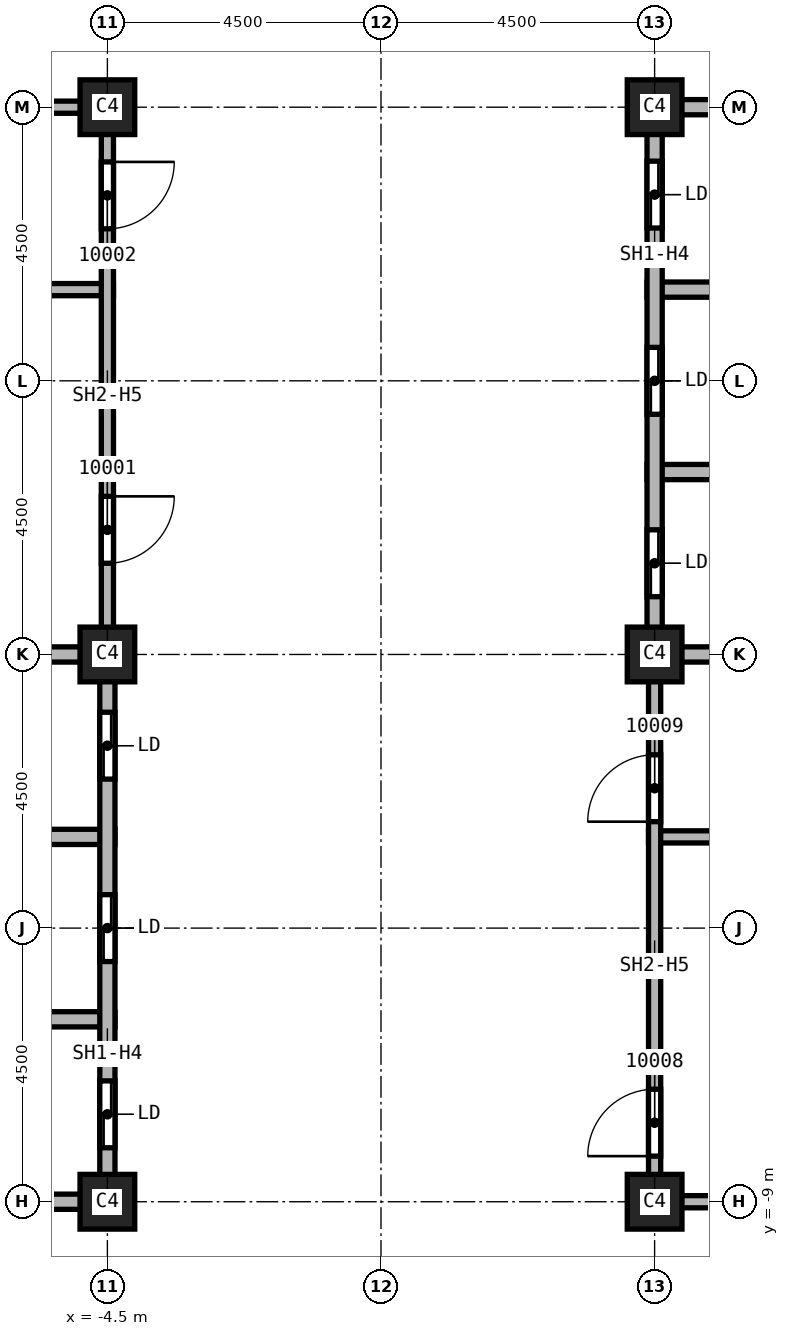
"""IFC4 building model, lengths in metres.
Left out: names, types, materials, properties, quantities, classifications, styles, units other than length and angle.
Written with IfcOpenShell. Run it as: python <this file> out.ifc"""

import sys

from ifc_helpers import new_model, si_unit, direction, frame, frame_2d, origin, origin_2d, place, context, subcontext, project, spatial, rectangle, extrude, element, fill, save


model = new_model("IFC4")
c1 = context("Model", 3, precision=1e-05, world=origin(), true_north=direction((0.0, 1.0)))
c2 = subcontext(c1, "Body", "Model", "MODEL_VIEW")
j1 = project(units=[si_unit("LENGTHUNIT", "METRE"), si_unit("PLANEANGLEUNIT", "RADIAN")], contexts=[c1])
p1 = place(None, origin())
s1 = spatial("IfcSite", under=j1, at=p1, CompositionType="ELEMENT")
p2 = place(p1, origin())
s2 = spatial("IfcBuilding", under=s1, at=p2, CompositionType="ELEMENT")
p3 = place(p2, frame((0.0, 0.0, 174.0)))
s3 = spatial("IfcBuildingStorey", under=s2, at=p3, CompositionType="ELEMENT", Elevation=174.0)
for number, where, z_axis, x_axis in (
    (1, (4.5, 0.0, 0.0), (0.0, 0.0, 1.0), (1.0, 0.0, 0.0)),
    (2, (4.5, 9.0, 0.0), (0.0, 0.0, 1.0), (1.0, 0.0, 0.0)),
    (3, (4.5, -9.0, 0.0), (0.0, 0.0, 1.0), (1.0, 0.0, 0.0)),
    (4, (-4.5, 0.0, 0.0), (0.0, 0.0, 1.0), (1.0, 0.0, 0.0)),
    (5, (-4.5, 9.0, 0.0), (0.0, 0.0, 1.0), (1.0, 0.0, 0.0)),
    (6, (-4.5, -9.0, 0.0), (0.0, 0.0, 1.0), (1.0, 0.0, 0.0)),
):
    element("IfcColumn", number, at=place(p3, frame(where, z_axis=z_axis, x_axis=x_axis)), inside=s3, PredefinedType="COLUMN", context=c2, shape_type="SweptSolid", body=[
        extrude(rectangle(XDim=0.9, YDim=0.9, at=origin_2d()), origin(), (0.0, 0.0, 1.0), 3.59),
    ])
p4 = place(p3, frame((-7.6, 6.0, 0.0), z_axis=(0.0, 0.0, 1.0), x_axis=(1.0, 0.0, 0.0)))
e7 = element("IfcWall", 7, at=p4, inside=s3, PredefinedType="SOLIDWALL", context=c2, shape_type="SweptSolid", body=[
    extrude(rectangle(XDim=3.2, YDim=0.2, at=frame_2d((1.6, 0.0))), origin(), (0.0, 0.0, 1.0), 3.59),
])
p5 = place(p3, frame((-7.5, 9.0, 0.0), z_axis=(0.0, 0.0, 1.0), x_axis=(1.0, 0.0, 0.0)))
e8 = element("IfcWall", 8, at=p5, inside=s3, PredefinedType="SOLIDWALL", context=c2, shape_type="SweptSolid", body=[
    extrude(rectangle(XDim=3.0, YDim=0.2, at=frame_2d((1.5, 0.0))), origin(), (0.0, 0.0, 1.0), 2.828),
])
p6 = place(p3, frame((-4.5, 9.1, 0.0), z_axis=(0.0, 0.0, 1.0), x_axis=(0.0, -1.0, 0.0)))
e9 = element("IfcWall", 9, at=p6, inside=s3, PredefinedType="SOLIDWALL", context=c2, shape_type="SweptSolid", body=[
    extrude(rectangle(XDim=9.1, YDim=0.2, at=frame_2d((4.55, 0.0))), origin(), (0.0, 0.0, 1.0), 2.828),
])
p7 = place(p6, frame((6.5, 0.0, 0.0)))
e10 = element("IfcOpeningElement", 10, at=p7, cuts=e9, PredefinedType="OPENING", context=c2, shape_type="SweptSolid", body=[
    extrude(rectangle(XDim=1.1, YDim=2.1, at=frame_2d((0.55, 1.05))), frame((0.0, 0.1, 0.0), z_axis=(0.0, -1.0, 0.0), x_axis=(1.0, 0.0, 0.0)), (0.0, 0.0, 1.0), 0.2),
])
p8 = place(p6, frame((1.0, 0.0, 0.0)))
e11 = element("IfcOpeningElement", 11, at=p8, cuts=e9, PredefinedType="OPENING", context=c2, shape_type="SweptSolid", body=[
    extrude(rectangle(XDim=1.1, YDim=2.1, at=frame_2d((0.55, 1.05))), frame((0.0, 0.1, 0.0), z_axis=(0.0, -1.0, 0.0), x_axis=(1.0, 0.0, 0.0)), (0.0, 0.0, 1.0), 0.2),
])
p9 = place(p3, frame((4.4, -3.0, 0.0), z_axis=(0.0, 0.0, 1.0), x_axis=(1.0, 0.0, 0.0)))
e12 = element("IfcWall", 12, at=p9, inside=s3, PredefinedType="SOLIDWALL", context=c2, shape_type="SweptSolid", body=[
    extrude(rectangle(XDim=3.225, YDim=0.2, at=frame_2d((1.613, 0.0))), origin(), (0.0, 0.0, 1.0), 3.59),
])
p10 = place(p3, frame((4.5, -9.1, 0.0), z_axis=(0.0, 0.0, 1.0), x_axis=(0.0, 1.0, 0.0)))
e13 = element("IfcWall", 13, at=p10, inside=s3, PredefinedType="SOLIDWALL", context=c2, shape_type="SweptSolid", body=[
    extrude(rectangle(XDim=9.1, YDim=0.2, at=frame_2d((4.55, 0.0))), origin(), (0.0, 0.0, 1.0), 2.828),
])
p11 = place(p10, frame((0.85, 0.0, 0.0)))
e14 = element("IfcOpeningElement", 14, at=p11, cuts=e13, PredefinedType="OPENING", context=c2, shape_type="SweptSolid", body=[
    extrude(rectangle(XDim=1.1, YDim=2.1, at=frame_2d((0.55, 1.05))), frame((0.0, 0.1, 0.0), z_axis=(0.0, -1.0, 0.0), x_axis=(1.0, 0.0, 0.0)), (0.0, 0.0, 1.0), 0.2),
])
p12 = place(p10, frame((6.35, 0.0, 0.0)))
e15 = element("IfcOpeningElement", 15, at=p12, cuts=e13, PredefinedType="OPENING", context=c2, shape_type="SweptSolid", body=[
    extrude(rectangle(XDim=1.1, YDim=2.1, at=frame_2d((0.55, 1.05))), frame((0.0, 0.1, 0.0), z_axis=(0.0, -1.0, 0.0), x_axis=(1.0, 0.0, 0.0)), (0.0, 0.0, 1.0), 0.2),
])
p13 = place(p3, frame((7.5, -9.0, 0.0), z_axis=(0.0, 0.0, 1.0), x_axis=(-1.0, 0.0, 0.0)))
e16 = element("IfcWall", 16, at=p13, inside=s3, PredefinedType="SOLIDWALL", context=c2, shape_type="SweptSolid", body=[
    extrude(rectangle(XDim=3.0, YDim=0.2, at=frame_2d((1.5, 0.0))), origin(), (0.0, 0.0, 1.0), 2.828),
])
p14 = place(p3, frame((-13.625, -3.0, 0.0), z_axis=(0.0, 0.0, 1.0), x_axis=(1.0, 0.0, 0.0)))
e17 = element("IfcWall", 17, at=p14, inside=s3, PredefinedType="SOLIDWALL", context=c2, shape_type="SweptSolid", body=[
    extrude(rectangle(XDim=9.25, YDim=0.25, at=frame_2d((4.625, 0.0))), origin(), (0.0, 0.0, 1.0), 3.59),
])
p15 = place(p14, frame((3.25, 0.0, 0.0)))
e18 = element("IfcOpeningElement", 18, at=p15, cuts=e17, PredefinedType="OPENING", context=c2, shape_type="SweptSolid", body=[
    extrude(rectangle(XDim=1.1, YDim=2.1, at=frame_2d((0.55, 1.05))), frame((0.0, 0.125, 0.0), z_axis=(0.0, -1.0, 0.0), x_axis=(1.0, 0.0, 0.0)), (0.0, 0.0, 1.0), 0.25),
])
for number, where, z_axis, x_axis in (
    (19, (-7.625, -6.0, 0.0), (0.0, 0.0, 1.0), (1.0, 0.0, 0.0)),
    (20, (-7.625, 0.0, 0.0), (0.0, 0.0, 1.0), (1.0, 0.0, 0.0)),
):
    element("IfcWall", number, at=place(p3, frame(where, z_axis=z_axis, x_axis=x_axis)), inside=s3, PredefinedType="SOLIDWALL", context=c2, shape_type="SweptSolid", body=[
        extrude(rectangle(XDim=3.25, YDim=0.25, at=frame_2d((1.625, 0.0))), origin(), (0.0, 0.0, 1.0), 3.59),
    ])
p16 = place(p3, frame((-4.5, -9.0, 0.0), z_axis=(0.0, 0.0, 1.0), x_axis=(-1.0, 0.0, 0.0)))
e21 = element("IfcWall", 21, at=p16, inside=s3, PredefinedType="SOLIDWALL", context=c2, shape_type="SweptSolid", body=[
    extrude(rectangle(XDim=3.0, YDim=0.25, at=frame_2d((1.5, 0.0))), origin(), (0.0, 0.0, 1.0), 2.828),
])
p17 = place(p3, frame((-4.5, 0.0, 0.0), z_axis=(0.0, 0.0, 1.0), x_axis=(0.0, -1.0, 0.0)))
e22 = element("IfcWall", 22, at=p17, inside=s3, PredefinedType="SOLIDWALL", context=c2, shape_type="SweptSolid", body=[
    extrude(rectangle(XDim=9.125, YDim=0.25, at=frame_2d((4.562, 0.0))), origin(), (0.0, 0.0, 1.0), 2.828),
])
p18 = place(p17, frame((7.012, 0.0, 0.0)))
e23 = element("IfcOpeningElement", 23, at=p18, cuts=e22, PredefinedType="OPENING", context=c2, shape_type="SweptSolid", body=[
    extrude(rectangle(XDim=1.1, YDim=2.1, at=frame_2d((0.55, 1.05))), frame((0.0, 0.125, 0.0), z_axis=(0.0, -1.0, 0.0), x_axis=(1.0, 0.0, 0.0)), (0.0, 0.0, 1.0), 0.25),
])
p19 = place(p17, frame((3.95, 0.0, 0.0)))
e24 = element("IfcOpeningElement", 24, at=p19, cuts=e22, PredefinedType="OPENING", context=c2, shape_type="SweptSolid", body=[
    extrude(rectangle(XDim=1.1, YDim=2.1, at=frame_2d((0.55, 1.05))), frame((0.0, 0.125, 0.0), z_axis=(0.0, -1.0, 0.0), x_axis=(1.0, 0.0, 0.0)), (0.0, 0.0, 1.0), 0.25),
])
p20 = place(p17, frame((0.95, 0.0, 0.0)))
e25 = element("IfcOpeningElement", 25, at=p20, cuts=e22, PredefinedType="OPENING", context=c2, shape_type="SweptSolid", body=[
    extrude(rectangle(XDim=1.1, YDim=2.1, at=frame_2d((0.55, 1.05))), frame((0.0, 0.125, 0.0), z_axis=(0.0, -1.0, 0.0), x_axis=(1.0, 0.0, 0.0)), (0.0, 0.0, 1.0), 0.25),
])
p21 = place(p3, frame((4.375, 0.0, 0.0), z_axis=(0.0, 0.0, 1.0), x_axis=(1.0, 0.0, 0.0)))
e26 = element("IfcWall", 26, at=p21, inside=s3, PredefinedType="SOLIDWALL", context=c2, shape_type="SweptSolid", body=[
    extrude(rectangle(XDim=3.25, YDim=0.25, at=frame_2d((1.625, 0.0))), origin(), (0.0, 0.0, 1.0), 3.59),
])
p22 = place(p3, frame((4.375, 3.0, 0.0), z_axis=(0.0, 0.0, 1.0), x_axis=(1.0, 0.0, 0.0)))
e27 = element("IfcWall", 27, at=p22, inside=s3, PredefinedType="SOLIDWALL", context=c2, shape_type="SweptSolid", body=[
    extrude(rectangle(XDim=9.25, YDim=0.25, at=frame_2d((4.625, 0.0))), origin(), (0.0, 0.0, 1.0), 3.59),
])
p23 = place(p22, frame((3.375, 0.0, 0.0)))
e28 = element("IfcOpeningElement", 28, at=p23, cuts=e27, PredefinedType="OPENING", context=c2, shape_type="SweptSolid", body=[
    extrude(rectangle(XDim=1.1, YDim=2.1, at=frame_2d((0.55, 1.05))), frame((0.0, 0.125, 0.0), z_axis=(0.0, -1.0, 0.0), x_axis=(1.0, 0.0, 0.0)), (0.0, 0.0, 1.0), 0.25),
])
p24 = place(p3, frame((4.375, 6.0, 0.0), z_axis=(0.0, 0.0, 1.0), x_axis=(1.0, 0.0, 0.0)))
e29 = element("IfcWall", 29, at=p24, inside=s3, PredefinedType="SOLIDWALL", context=c2, shape_type="SweptSolid", body=[
    extrude(rectangle(XDim=3.25, YDim=0.25, at=frame_2d((1.625, 0.0))), origin(), (0.0, 0.0, 1.0), 3.59),
])
p25 = place(p3, frame((4.5, 0.0, 0.0), z_axis=(0.0, 0.0, 1.0), x_axis=(0.0, 1.0, 0.0)))
e30 = element("IfcWall", 30, at=p25, inside=s3, PredefinedType="SOLIDWALL", context=c2, shape_type="SweptSolid", body=[
    extrude(rectangle(XDim=9.125, YDim=0.25, at=frame_2d((4.562, 0.0))), origin(), (0.0, 0.0, 1.0), 2.828),
])
p26 = place(p25, frame((0.95, 0.0, 0.0)))
e31 = element("IfcOpeningElement", 31, at=p26, cuts=e30, PredefinedType="OPENING", context=c2, shape_type="SweptSolid", body=[
    extrude(rectangle(XDim=1.1, YDim=2.1, at=frame_2d((0.55, 1.05))), frame((0.0, 0.125, 0.0), z_axis=(0.0, -1.0, 0.0), x_axis=(1.0, 0.0, 0.0)), (0.0, 0.0, 1.0), 0.25),
])
p27 = place(p25, frame((3.95, 0.0, 0.0)))
e32 = element("IfcOpeningElement", 32, at=p27, cuts=e30, PredefinedType="OPENING", context=c2, shape_type="SweptSolid", body=[
    extrude(rectangle(XDim=1.1, YDim=2.1, at=frame_2d((0.55, 1.05))), frame((0.0, 0.125, 0.0), z_axis=(0.0, -1.0, 0.0), x_axis=(1.0, 0.0, 0.0)), (0.0, 0.0, 1.0), 0.25),
])
p28 = place(p25, frame((7.012, 0.0, 0.0)))
e33 = element("IfcOpeningElement", 33, at=p28, cuts=e30, PredefinedType="OPENING", context=c2, shape_type="SweptSolid", body=[
    extrude(rectangle(XDim=1.1, YDim=2.1, at=frame_2d((0.55, 1.05))), frame((0.0, 0.125, 0.0), z_axis=(0.0, -1.0, 0.0), x_axis=(1.0, 0.0, 0.0)), (0.0, 0.0, 1.0), 0.25),
])
p29 = place(p3, frame((4.5, 9.0, 0.0), z_axis=(0.0, 0.0, 1.0), x_axis=(1.0, 0.0, 0.0)))
e34 = element("IfcWall", 34, at=p29, inside=s3, PredefinedType="SOLIDWALL", context=c2, shape_type="SweptSolid", body=[
    extrude(rectangle(XDim=3.0, YDim=0.25, at=frame_2d((1.5, 0.0))), origin(), (0.0, 0.0, 1.0), 2.828),
])
p30 = place(p7, origin())
e35 = element("IfcDoor", 35, at=p30, inside=s3, OperationType="SINGLE_SWING_RIGHT", PredefinedType="DOOR", context=c2, shape_type="SweptSolid", body=[
    extrude(rectangle(XDim=1.1, YDim=2.1, at=frame_2d((0.55, 1.05))), frame((0.0, 0.025, 0.0), z_axis=(0.0, -1.0, 0.0), x_axis=(1.0, 0.0, 0.0)), (0.0, 0.0, 1.0), 0.05),
])
fill(e10, e35)
p31 = place(p8, origin())
e36 = element("IfcDoor", 36, at=p31, inside=s3, OperationType="SINGLE_SWING_LEFT", PredefinedType="DOOR", context=c2, shape_type="SweptSolid", body=[
    extrude(rectangle(XDim=1.1, YDim=2.1, at=frame_2d((0.55, 1.05))), frame((0.0, 0.025, 0.0), z_axis=(0.0, -1.0, 0.0), x_axis=(1.0, 0.0, 0.0)), (0.0, 0.0, 1.0), 0.05),
])
fill(e11, e36)
p32 = place(p11, origin())
e37 = element("IfcDoor", 37, at=p32, inside=s3, OperationType="SINGLE_SWING_LEFT", PredefinedType="DOOR", context=c2, shape_type="SweptSolid", body=[
    extrude(rectangle(XDim=1.1, YDim=2.1, at=frame_2d((0.55, 1.05))), frame((0.0, 0.025, 0.0), z_axis=(0.0, -1.0, 0.0), x_axis=(1.0, 0.0, 0.0)), (0.0, 0.0, 1.0), 0.05),
])
fill(e14, e37)
p33 = place(p12, origin())
e38 = element("IfcDoor", 38, at=p33, inside=s3, OperationType="SINGLE_SWING_RIGHT", PredefinedType="DOOR", context=c2, shape_type="SweptSolid", body=[
    extrude(rectangle(XDim=1.1, YDim=2.1, at=frame_2d((0.55, 1.05))), frame((0.0, 0.025, 0.0), z_axis=(0.0, -1.0, 0.0), x_axis=(1.0, 0.0, 0.0)), (0.0, 0.0, 1.0), 0.05),
])
fill(e15, e38)
p34 = place(p18, origin())
e39 = element("IfcDoor", 39, at=p34, inside=s3, OperationType="SLIDING_TO_LEFT", PredefinedType="DOOR", context=c2, shape_type="SweptSolid", body=[
    extrude(rectangle(XDim=1.1, YDim=2.1, at=frame_2d((0.55, 1.05))), frame((0.0, 0.025, 0.0), z_axis=(0.0, -1.0, 0.0), x_axis=(1.0, 0.0, 0.0)), (0.0, 0.0, 1.0), 0.05),
])
fill(e23, e39)
p35 = place(p19, origin())
e40 = element("IfcDoor", 40, at=p35, inside=s3, OperationType="SLIDING_TO_LEFT", PredefinedType="DOOR", context=c2, shape_type="SweptSolid", body=[
    extrude(rectangle(XDim=1.1, YDim=2.1, at=frame_2d((0.55, 1.05))), frame((0.0, 0.025, 0.0), z_axis=(0.0, -1.0, 0.0), x_axis=(1.0, 0.0, 0.0)), (0.0, 0.0, 1.0), 0.05),
])
fill(e24, e40)
p36 = place(p20, origin())
e41 = element("IfcDoor", 41, at=p36, inside=s3, OperationType="SLIDING_TO_LEFT", PredefinedType="DOOR", context=c2, shape_type="SweptSolid", body=[
    extrude(rectangle(XDim=1.1, YDim=2.1, at=frame_2d((0.55, 1.05))), frame((0.0, 0.025, 0.0), z_axis=(0.0, -1.0, 0.0), x_axis=(1.0, 0.0, 0.0)), (0.0, 0.0, 1.0), 0.05),
])
fill(e25, e41)
p37 = place(p26, origin())
e42 = element("IfcDoor", 42, at=p37, inside=s3, OperationType="SLIDING_TO_LEFT", PredefinedType="DOOR", context=c2, shape_type="SweptSolid", body=[
    extrude(rectangle(XDim=1.1, YDim=2.1, at=frame_2d((0.55, 1.05))), frame((0.0, 0.025, 0.0), z_axis=(0.0, -1.0, 0.0), x_axis=(1.0, 0.0, 0.0)), (0.0, 0.0, 1.0), 0.05),
])
fill(e31, e42)
p38 = place(p27, origin())
e43 = element("IfcDoor", 43, at=p38, inside=s3, OperationType="SLIDING_TO_LEFT", PredefinedType="DOOR", context=c2, shape_type="SweptSolid", body=[
    extrude(rectangle(XDim=1.1, YDim=2.1, at=frame_2d((0.55, 1.05))), frame((0.0, 0.025, 0.0), z_axis=(0.0, -1.0, 0.0), x_axis=(1.0, 0.0, 0.0)), (0.0, 0.0, 1.0), 0.05),
])
fill(e32, e43)
p39 = place(p28, origin())
e44 = element("IfcDoor", 44, at=p39, inside=s3, OperationType="SLIDING_TO_LEFT", PredefinedType="DOOR", context=c2, shape_type="SweptSolid", body=[
    extrude(rectangle(XDim=1.1, YDim=2.1, at=frame_2d((0.55, 1.05))), frame((0.0, 0.025, 0.0), z_axis=(0.0, -1.0, 0.0), x_axis=(1.0, 0.0, 0.0)), (0.0, 0.0, 1.0), 0.05),
])
fill(e33, e44)
save(model, sys.argv[1])
